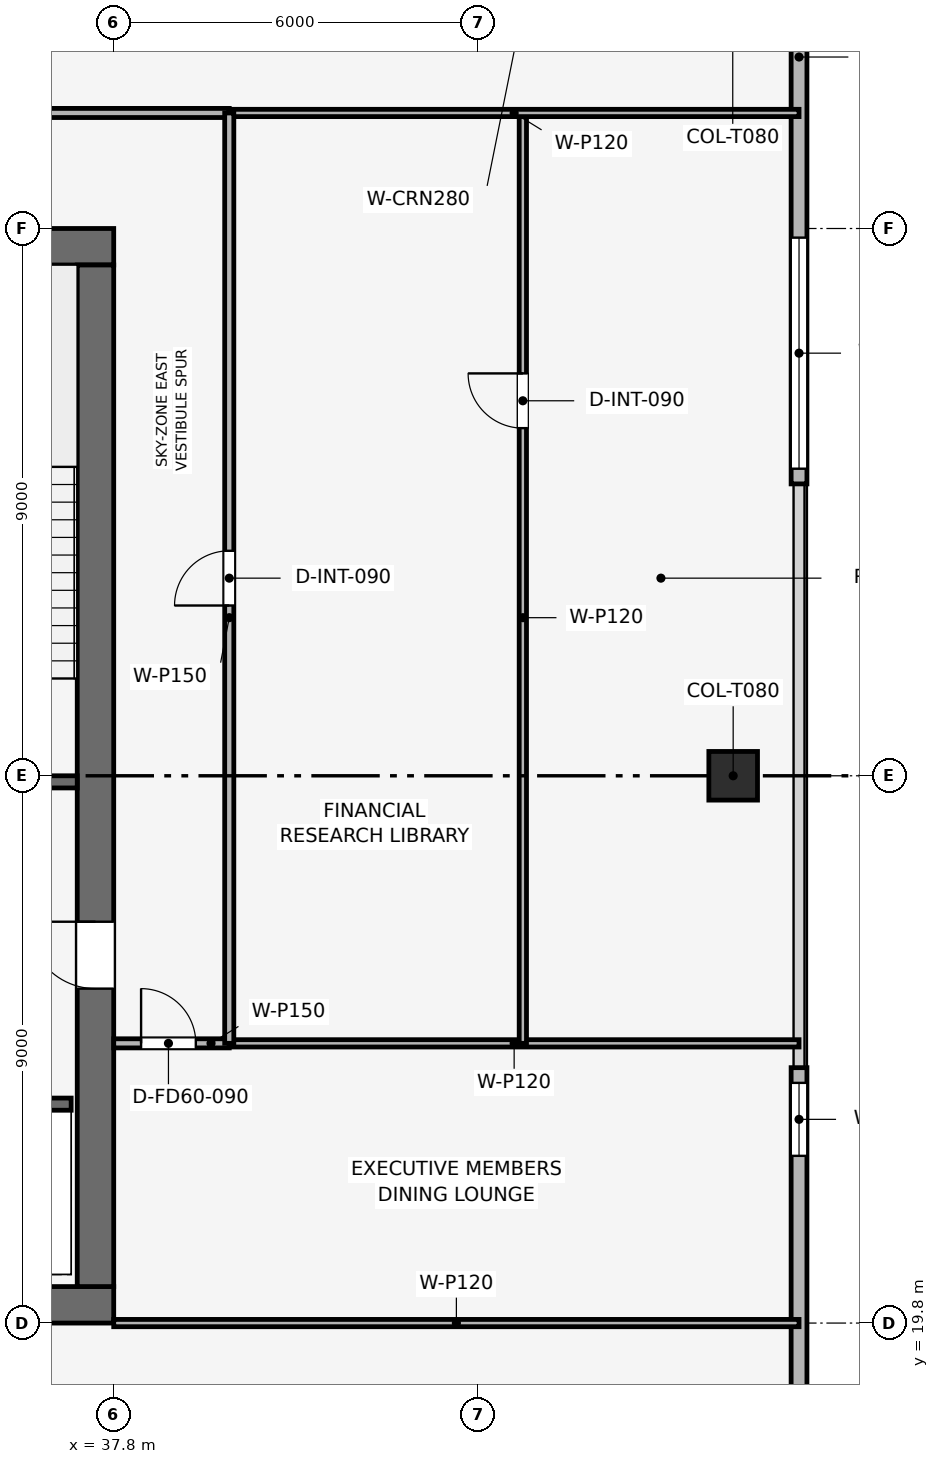
"""IFC4 building model, lengths in metres.
Left out: names, types, materials, properties, quantities, classifications, styles, units other than length and angle.
Written with IfcOpenShell. Run it as: python <this file> out.ifc"""

import sys

from ifc_helpers import new_model, si_unit, direction, frame, frame_2d, origin, origin_2d, place, context, subcontext, project, spatial, rectangle, extrude, element, fill, save


model = new_model("IFC4")
c1 = context("Model", 3, precision=1e-05, world=origin(), true_north=direction((0.0, 1.0)))
c2 = subcontext(c1, "Body", "Model", "MODEL_VIEW")
j1 = project(units=[si_unit("LENGTHUNIT", "METRE"), si_unit("PLANEANGLEUNIT", "RADIAN")], contexts=[c1])
p1 = place(None, origin())
s1 = spatial("IfcSite", under=j1, at=p1, CompositionType="ELEMENT")
p2 = place(p1, origin())
s2 = spatial("IfcBuilding", under=s1, at=p2, CompositionType="ELEMENT")
p3 = place(p2, frame((0.0, 0.0, 364.5)))
s3 = spatial("IfcBuildingStorey", under=s2, at=p3, CompositionType="ELEMENT", Elevation=364.5)
p4 = place(p3, frame((19.8, 20.1, 0.0), z_axis=(0.0, 0.0, 1.0), x_axis=(1.0, 0.0, 0.0)))
e1 = element("IfcWall", 1, at=p4, inside=s3, PredefinedType="SHEAR", context=c2, shape_type="SweptSolid", body=[
    extrude(rectangle(XDim=18.0, YDim=0.6, at=frame_2d((9.0, 0.0))), origin(), (0.0, 0.0, 1.0), 4.5),
])
p5 = place(p3, frame((19.8, 37.5, 0.0), z_axis=(0.0, 0.0, 1.0), x_axis=(1.0, 0.0, 0.0)))
e2 = element("IfcWall", 2, at=p5, inside=s3, PredefinedType="SHEAR", context=c2, shape_type="SweptSolid", body=[
    extrude(rectangle(XDim=18.0, YDim=0.6, at=frame_2d((9.0, 0.0))), origin(), (0.0, 0.0, 1.0), 4.5),
])
p6 = place(p5, frame((7.05, 0.0, 0.0)))
e3 = element("IfcOpeningElement", 3, at=p6, cuts=e2, PredefinedType="OPENING", context=c2, shape_type="SweptSolid", body=[
    extrude(rectangle(XDim=1.1, YDim=2.15, at=frame_2d((0.55, 1.075))), frame((0.0, 0.31, 0.0), z_axis=(0.0, -1.0, 0.0), x_axis=(1.0, 0.0, 0.0)), (0.0, 0.0, 1.0), 0.62),
])
p7 = place(p3, frame((37.5, 20.4, 0.0), z_axis=(0.0, 0.0, 1.0), x_axis=(0.0, 1.0, 0.0)))
e4 = element("IfcWall", 4, at=p7, inside=s3, PredefinedType="SHEAR", context=c2, shape_type="SweptSolid", body=[
    extrude(rectangle(XDim=16.8, YDim=0.6, at=frame_2d((8.4, 0.0))), origin(), (0.0, 0.0, 1.0), 4.5),
])
p8 = place(p7, frame((4.9, 0.0, 0.0)))
e5 = element("IfcOpeningElement", 5, at=p8, cuts=e4, PredefinedType="OPENING", context=c2, shape_type="SweptSolid", body=[
    extrude(rectangle(XDim=1.1, YDim=2.15, at=frame_2d((0.55, 1.075))), frame((0.0, 0.31, 0.0), z_axis=(0.0, -1.0, 0.0), x_axis=(1.0, 0.0, 0.0)), (0.0, 0.0, 1.0), 0.62),
])
p9 = place(p3, frame((47.987, 28.8, 0.033), z_axis=(-0.371428235787, 0.0, 0.928461666231), x_axis=(0.0, -1.0, 0.0)))
e6 = element("IfcColumn", 6, at=p9, inside=s3, PredefinedType="COLUMN", context=c2, shape_type="SweptSolid", body=[
    extrude(rectangle(XDim=0.8, YDim=0.8, at=origin_2d()), origin(), (0.0, 0.0, 1.0), 4.483),
])
p10 = place(p3, frame((47.98, 41.789, 0.051), z_axis=(-0.363749581663, -0.202047238794, 0.909320160964), x_axis=(0.485577069989, -0.874193862425, 0.0)))
e7 = element("IfcColumn", 7, at=p10, inside=s3, PredefinedType="COLUMN", context=c2, shape_type="SweptSolid", body=[
    extrude(rectangle(XDim=0.8, YDim=0.8, at=origin_2d()), origin(), (0.0, 0.0, 1.0), 4.539),
])
p11 = place(p3, frame((49.07, 43.6, 0.0), z_axis=(0.0, 0.0, 1.0), x_axis=(0.0, -1.0, 0.0)))
e8 = element("IfcWall", 8, at=p11, inside=s3, PredefinedType="SOLIDWALL", context=c2, shape_type="SweptSolid", body=[
    extrude(rectangle(XDim=10.0, YDim=0.26, at=frame_2d((5.0, 0.0))), origin(), (0.0, 0.0, 1.0), 4.2),
])
p12 = place(p11, frame((5.95, 0.0, 0.9)))
e9 = element("IfcOpeningElement", 9, at=p12, cuts=e8, PredefinedType="OPENING", context=c2, shape_type="SweptSolid", body=[
    extrude(rectangle(XDim=3.8, YDim=1.9, at=frame_2d((1.9, 0.95))), frame((0.0, 0.14, 0.0), z_axis=(0.0, -1.0, 0.0), x_axis=(1.0, 0.0, 0.0)), (0.0, 0.0, 1.0), 0.28),
])
p13 = place(p3, frame((49.07, 24.0, 0.0), z_axis=(0.0, 0.0, 1.0), x_axis=(0.0, -1.0, 0.0)))
e10 = element("IfcWall", 10, at=p13, inside=s3, PredefinedType="SOLIDWALL", context=c2, shape_type="SweptSolid", body=[
    extrude(rectangle(XDim=10.0, YDim=0.26, at=frame_2d((5.0, 0.0))), origin(), (0.0, 0.0, 1.0), 4.2),
])
p14 = place(p13, frame((0.25, 0.0, 0.9)))
e11 = element("IfcOpeningElement", 11, at=p14, cuts=e10, PredefinedType="OPENING", context=c2, shape_type="SweptSolid", body=[
    extrude(rectangle(XDim=1.2, YDim=2.1, at=frame_2d((0.6, 1.05))), frame((0.0, 0.14, 0.0), z_axis=(0.0, -1.0, 0.0), x_axis=(1.0, 0.0, 0.0)), (0.0, 0.0, 1.0), 0.28),
])
p15 = place(p3, frame((34.05, 28.7, 0.0), z_axis=(0.0, 0.0, 1.0), x_axis=(1.0, 0.0, 0.0)))
e12 = element("IfcWall", 12, at=p15, inside=s3, PredefinedType="SHEAR", context=c2, shape_type="SweptSolid", body=[
    extrude(rectangle(XDim=3.15, YDim=0.2, at=frame_2d((1.575, 0.0))), origin(), (0.0, 0.0, 1.0), 4.2),
])
p16 = place(p15, frame((0.8, 0.0, 0.0)))
e13 = element("IfcOpeningElement", 13, at=p16, cuts=e12, PredefinedType="OPENING", context=c2, shape_type="SweptSolid", body=[
    extrude(rectangle(XDim=1.0, YDim=2.1, at=frame_2d((0.5, 1.05))), frame((0.0, 0.11, 0.0), z_axis=(0.0, -1.0, 0.0), x_axis=(1.0, 0.0, 0.0)), (0.0, 0.0, 1.0), 0.22),
])
p17 = place(p3, frame((34.05, 23.4, 0.0), z_axis=(0.0, 0.0, 1.0), x_axis=(1.0, 0.0, 0.0)))
e14 = element("IfcWall", 14, at=p17, inside=s3, PredefinedType="SHEAR", context=c2, shape_type="SweptSolid", body=[
    extrude(rectangle(XDim=3.05, YDim=0.2, at=frame_2d((1.525, 0.0))), origin(), (0.0, 0.0, 1.0), 4.2),
])
p18 = place(p17, frame((1.2, 0.0, 0.0)))
e15 = element("IfcOpeningElement", 15, at=p18, cuts=e14, PredefinedType="OPENING", context=c2, shape_type="SweptSolid", body=[
    extrude(rectangle(XDim=1.1, YDim=2.15, at=frame_2d((0.55, 1.075))), frame((0.0, 0.11, 0.0), z_axis=(0.0, -1.0, 0.0), x_axis=(1.0, 0.0, 0.0)), (0.0, 0.0, 1.0), 0.22),
])
p19 = place(p3, frame((37.8, 19.8, 0.0), z_axis=(0.0, 0.0, 1.0), x_axis=(1.0, 0.0, 0.0)))
e16 = element("IfcWall", 16, at=p19, inside=s3, PredefinedType="PARTITIONING", context=c2, shape_type="SweptSolid", body=[
    extrude(rectangle(XDim=11.27, YDim=0.12, at=frame_2d((5.635, 0.0))), origin(), (0.0, 0.0, 1.0), 3.785),
])
p20 = place(p3, frame((37.8, 24.4, 0.0), z_axis=(0.0, 0.0, 1.0), x_axis=(1.0, 0.0, 0.0)))
e17 = element("IfcWall", 17, at=p20, inside=s3, PredefinedType="PARTITIONING", context=c2, shape_type="SweptSolid", body=[
    extrude(rectangle(XDim=1.9, YDim=0.15, at=frame_2d((0.95, 0.0))), origin(), (0.0, 0.0, 1.0), 4.2),
])
p21 = place(p20, frame((0.45, 0.0, 0.0)))
e18 = element("IfcOpeningElement", 18, at=p21, cuts=e17, PredefinedType="OPENING", context=c2, shape_type="SweptSolid", body=[
    extrude(rectangle(XDim=0.9, YDim=2.1, at=frame_2d((0.45, 1.05))), frame((0.0, 0.085, 0.0), z_axis=(0.0, -1.0, 0.0), x_axis=(1.0, 0.0, 0.0)), (0.0, 0.0, 1.0), 0.17),
])
p22 = place(p3, frame((39.7, 24.4, 0.0), z_axis=(0.0, 0.0, 1.0), x_axis=(1.0, 0.0, 0.0)))
e19 = element("IfcWall", 19, at=p22, inside=s3, PredefinedType="PARTITIONING", context=c2, shape_type="SweptSolid", body=[
    extrude(rectangle(XDim=9.37, YDim=0.12, at=frame_2d((4.685, 0.0))), origin(), (0.0, 0.0, 1.0), 3.825),
])
p23 = place(p3, frame((44.528, 24.4, 0.0), z_axis=(0.0, 0.0, 1.0), x_axis=(0.0, 1.0, 0.0)))
e20 = element("IfcWall", 20, at=p23, inside=s3, PredefinedType="PARTITIONING", context=c2, shape_type="SweptSolid", body=[
    extrude(rectangle(XDim=15.3, YDim=0.12, at=frame_2d((7.65, 0.0))), origin(), (0.0, 0.0, 1.0), 3.285),
])
p24 = place(p23, frame((10.117, 0.0, 0.0)))
e21 = element("IfcOpeningElement", 21, at=p24, cuts=e20, PredefinedType="OPENING", context=c2, shape_type="SweptSolid", body=[
    extrude(rectangle(XDim=0.9, YDim=2.1, at=frame_2d((0.45, 1.05))), frame((0.0, 0.07, 0.0), z_axis=(0.0, -1.0, 0.0), x_axis=(1.0, 0.0, 0.0)), (0.0, 0.0, 1.0), 0.14),
])
p25 = place(p3, frame((39.7, 39.7, 0.0), z_axis=(0.0, 0.0, 1.0), x_axis=(1.0, 0.0, 0.0)))
e22 = element("IfcWall", 22, at=p25, inside=s3, PredefinedType="PARTITIONING", context=c2, shape_type="SweptSolid", body=[
    extrude(rectangle(XDim=9.37, YDim=0.12, at=frame_2d((4.685, 0.0))), origin(), (0.0, 0.0, 1.0), 3.785),
])
p26 = place(p3, frame((17.9, 39.7, 0.0), z_axis=(0.0, 0.0, 1.0), x_axis=(1.0, 0.0, 0.0)))
e23 = element("IfcWall", 23, at=p26, inside=s3, PredefinedType="PARTITIONING", context=c2, shape_type="SweptSolid", body=[
    extrude(rectangle(XDim=21.8, YDim=0.15, at=frame_2d((10.9, 0.0))), origin(), (0.0, 0.0, 1.0), 3.285),
])
p27 = place(p26, frame((2.1, 0.0, 0.0)))
e24 = element("IfcOpeningElement", 24, at=p27, cuts=e23, PredefinedType="OPENING", context=c2, shape_type="SweptSolid", body=[
    extrude(rectangle(XDim=0.9, YDim=2.1, at=frame_2d((0.45, 1.05))), frame((0.0, 0.085, 0.0), z_axis=(0.0, -1.0, 0.0), x_axis=(1.0, 0.0, 0.0)), (0.0, 0.0, 1.0), 0.17),
])
p28 = place(p26, frame((6.05, 0.0, 0.0)))
e25 = element("IfcOpeningElement", 25, at=p28, cuts=e23, PredefinedType="OPENING", context=c2, shape_type="SweptSolid", body=[
    extrude(rectangle(XDim=0.9, YDim=2.1, at=frame_2d((0.45, 1.05))), frame((0.0, 0.085, 0.0), z_axis=(0.0, -1.0, 0.0), x_axis=(1.0, 0.0, 0.0)), (0.0, 0.0, 1.0), 0.17),
])
p29 = place(p26, frame((8.95, 0.0, 0.0)))
e26 = element("IfcOpeningElement", 26, at=p29, cuts=e23, PredefinedType="OPENING", context=c2, shape_type="SweptSolid", body=[
    extrude(rectangle(XDim=0.9, YDim=2.1, at=frame_2d((0.45, 1.05))), frame((0.0, 0.085, 0.0), z_axis=(0.0, -1.0, 0.0), x_axis=(1.0, 0.0, 0.0)), (0.0, 0.0, 1.0), 0.17),
])
p30 = place(p26, frame((11.7, 0.0, 0.0)))
e27 = element("IfcOpeningElement", 27, at=p30, cuts=e23, PredefinedType="OPENING", context=c2, shape_type="SweptSolid", body=[
    extrude(rectangle(XDim=0.95, YDim=2.1, at=frame_2d((0.475, 1.05))), frame((0.0, 0.085, 0.0), z_axis=(0.0, -1.0, 0.0), x_axis=(1.0, 0.0, 0.0)), (0.0, 0.0, 1.0), 0.17),
])
p31 = place(p26, frame((17.2, 0.0, 0.0)))
e28 = element("IfcOpeningElement", 28, at=p31, cuts=e23, PredefinedType="OPENING", context=c2, shape_type="SweptSolid", body=[
    extrude(rectangle(XDim=0.9, YDim=2.1, at=frame_2d((0.45, 1.05))), frame((0.0, 0.085, 0.0), z_axis=(0.0, -1.0, 0.0), x_axis=(1.0, 0.0, 0.0)), (0.0, 0.0, 1.0), 0.17),
])
p32 = place(p3, frame((39.7, 24.4, 0.0), z_axis=(0.0, 0.0, 1.0), x_axis=(0.0, 1.0, 0.0)))
e29 = element("IfcWall", 29, at=p32, inside=s3, PredefinedType="PARTITIONING", context=c2, shape_type="SweptSolid", body=[
    extrude(rectangle(XDim=15.3, YDim=0.15, at=frame_2d((7.65, 0.0))), origin(), (0.0, 0.0, 1.0), 3.285),
])
p33 = place(p32, frame((7.2, 0.0, 0.0)))
e30 = element("IfcOpeningElement", 30, at=p33, cuts=e29, PredefinedType="OPENING", context=c2, shape_type="SweptSolid", body=[
    extrude(rectangle(XDim=0.9, YDim=2.1, at=frame_2d((0.45, 1.05))), frame((0.0, 0.085, 0.0), z_axis=(0.0, -1.0, 0.0), x_axis=(1.0, 0.0, 0.0)), (0.0, 0.0, 1.0), 0.17),
])
p34 = place(p12, origin())
e31 = element("IfcWindow", 31, at=p34, inside=s3, PartitioningType="SINGLE_PANEL", PredefinedType="WINDOW", context=c2, shape_type="SweptSolid", body=[
    extrude(rectangle(XDim=3.8, YDim=1.9, at=frame_2d((1.9, 0.95))), frame((0.0, 0.03, 0.0), z_axis=(0.0, -1.0, 0.0), x_axis=(1.0, 0.0, 0.0)), (0.0, 0.0, 1.0), 0.06),
])
fill(e9, e31)
p35 = place(p14, origin())
e32 = element("IfcWindow", 32, at=p35, inside=s3, PartitioningType="SINGLE_PANEL", PredefinedType="WINDOW", context=c2, shape_type="SweptSolid", body=[
    extrude(rectangle(XDim=1.2, YDim=2.1, at=frame_2d((0.6, 1.05))), frame((0.0, 0.03, 0.0), z_axis=(0.0, -1.0, 0.0), x_axis=(1.0, 0.0, 0.0)), (0.0, 0.0, 1.0), 0.06),
])
fill(e11, e32)
p36 = place(p21, origin())
e33 = element("IfcDoor", 33, at=p36, inside=s3, OperationType="SINGLE_SWING_LEFT", PredefinedType="DOOR", context=c2, shape_type="SweptSolid", body=[
    extrude(rectangle(XDim=0.9, YDim=2.1, at=frame_2d((0.45, 1.05))), frame((0.0, 0.025, 0.0), z_axis=(0.0, -1.0, 0.0), x_axis=(1.0, 0.0, 0.0)), (0.0, 0.0, 1.0), 0.05),
])
fill(e18, e33)
p37 = place(p24, origin())
e34 = element("IfcDoor", 34, at=p37, inside=s3, OperationType="SINGLE_SWING_RIGHT", PredefinedType="DOOR", context=c2, shape_type="SweptSolid", body=[
    extrude(rectangle(XDim=0.9, YDim=2.1, at=frame_2d((0.45, 1.05))), frame((0.0, 0.025, 0.0), z_axis=(0.0, -1.0, 0.0), x_axis=(1.0, 0.0, 0.0)), (0.0, 0.0, 1.0), 0.05),
])
fill(e21, e34)
p38 = place(p33, origin())
e35 = element("IfcDoor", 35, at=p38, inside=s3, OperationType="SINGLE_SWING_LEFT", PredefinedType="DOOR", context=c2, shape_type="SweptSolid", body=[
    extrude(rectangle(XDim=0.9, YDim=2.1, at=frame_2d((0.45, 1.05))), frame((0.0, 0.025, 0.0), z_axis=(0.0, -1.0, 0.0), x_axis=(1.0, 0.0, 0.0)), (0.0, 0.0, 1.0), 0.05),
])
fill(e30, e35)
p39 = place(p8, origin())
e36 = element("IfcDoor", 36, at=p39, inside=s3, OperationType="SINGLE_SWING_RIGHT", PredefinedType="DOOR", context=c2, shape_type="SweptSolid", body=[
    extrude(rectangle(XDim=1.1, YDim=2.15, at=frame_2d((0.55, 1.075))), frame((0.0, 0.025, 0.0), z_axis=(0.0, -1.0, 0.0), x_axis=(1.0, 0.0, 0.0)), (0.0, 0.0, 1.0), 0.05),
])
fill(e5, e36)
save(model, sys.argv[1])
